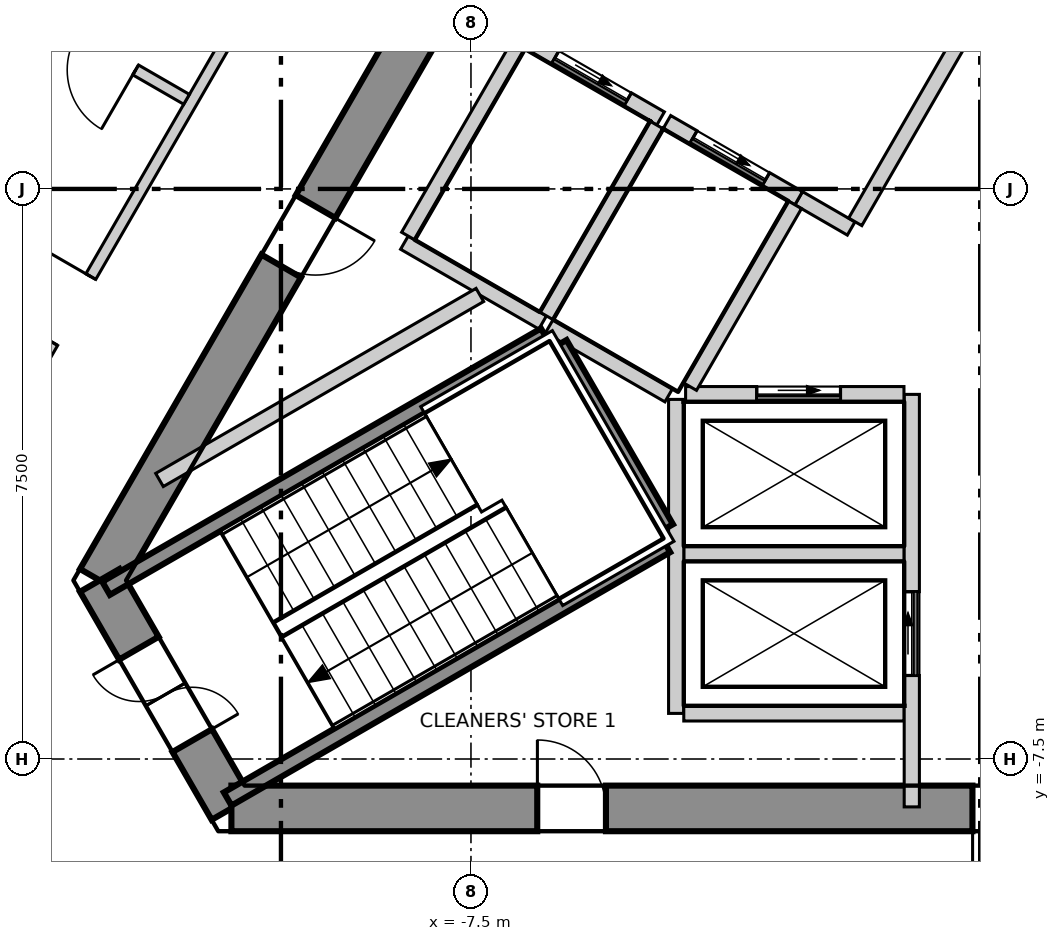
"""IFC4 building model, lengths in metres.
Left out: names, types, materials, properties, quantities, classifications, styles, units other than length and angle.
Written with IfcOpenShell. Run it as: python <this file> out.ifc"""

import sys

from ifc_helpers import new_model, si_unit, direction, frame, frame_2d, origin, place, context, subcontext, project, spatial, polyline, rectangle, outline, extrude, element, fill, save


model = new_model("IFC4")
c1 = context("Model", 3, precision=1e-05, world=origin(), true_north=direction((0.0, 1.0)))
c2 = subcontext(c1, "Body", "Model", "MODEL_VIEW")
j1 = project(units=[si_unit("LENGTHUNIT", "METRE"), si_unit("PLANEANGLEUNIT", "RADIAN")], contexts=[c1])
p1 = place(None, origin())
s1 = spatial("IfcSite", under=j1, at=p1, CompositionType="ELEMENT")
p2 = place(p1, origin())
s2 = spatial("IfcBuilding", under=s1, at=p2, CompositionType="ELEMENT")
p3 = place(p2, frame((0.0, 0.0, 279.1)))
s3 = spatial("IfcBuildingStorey", under=s2, at=p3, CompositionType="ELEMENT", Elevation=279.1)
p4 = place(p3, frame((-1.732, 13.3, -0.3), z_axis=(0.0, 0.0, 1.0), x_axis=(-0.500000539815, -0.866025092122, 0.0)))
e1 = element("IfcWall", 1, at=p4, inside=s3, PredefinedType="SHEAR", context=c2, shape_type="SweptSolid", body=[
    extrude(outline(polyline([(-0.173, -0.3), (1.795, -0.3), (3.763, -0.3), (5.732, -0.3), (7.7, -0.3), (9.668, -0.301), (11.637, -0.301), (13.605, -0.301), (15.573, -0.301), (17.542, -0.301), (19.51, -0.301), (21.478, -0.301), (21.131, 0.3), (19.226, 0.3), (17.321, 0.3), (15.415, 0.3), (13.51, 0.3), (11.605, 0.3), (9.699, 0.3), (7.794, 0.3), (5.889, 0.3), (3.984, 0.3), (2.078, 0.3), (0.173, 0.3), (-0.173, -0.3)])), origin(), (0.0, 0.0, 1.0), 3.6),
])
p5 = place(p4, frame((10.102, 0.0, 0.3)))
e2 = element("IfcOpeningElement", 2, at=p5, cuts=e1, PredefinedType="OPENING", context=c2, shape_type="SweptSolid", body=[
    extrude(rectangle(XDim=1.1, YDim=2.1, at=frame_2d((0.55, 1.05))), frame((0.0, 0.31, 0.0), z_axis=(0.0, -1.0, 0.0), x_axis=(1.0, 0.0, 0.0)), (0.0, 0.0, 1.0), 0.621),
])
p6 = place(p4, frame((15.627, 0.0, 0.3)))
e3 = element("IfcOpeningElement", 3, at=p6, cuts=e1, PredefinedType="OPENING", context=c2, shape_type="SweptSolid", body=[
    extrude(rectangle(XDim=0.9, YDim=2.1, at=frame_2d((0.45, 1.05))), frame((0.0, 0.31, 0.0), z_axis=(0.0, -1.0, 0.0), x_axis=(1.0, 0.0, 0.0)), (0.0, 0.0, 1.0), 0.621),
])
p7 = place(p3, frame((-12.384, -5.15, -0.3), z_axis=(0.0, 0.0, 1.0), x_axis=(0.49997462182, -0.866040055388, 0.0)))
e4 = element("IfcWall", 4, at=p7, inside=s3, PredefinedType="SHEAR", context=c2, shape_type="SweptSolid", body=[
    extrude(outline(polyline([(-0.173, -0.301), (1.732, -0.301), (3.637, -0.3), (3.291, 0.3), (1.732, 0.3), (0.173, 0.3), (-0.173, -0.301)])), origin(), (0.0, 0.0, 1.0), 3.6),
])
p8 = place(p7, frame((1.032, 0.0, 0.3)))
e5 = element("IfcOpeningElement", 5, at=p8, cuts=e4, PredefinedType="OPENING", context=c2, shape_type="SweptSolid", body=[
    extrude(rectangle(XDim=1.4, YDim=2.1, at=frame_2d((0.7, 1.05))), frame((0.0, 0.31, 0.0), z_axis=(0.0, -1.0, 0.0), x_axis=(1.0, 0.0, 0.0)), (0.0, 0.0, 1.0), 0.621),
])
p9 = place(p3, frame((-10.652, -8.15, -0.3), z_axis=(0.0, 0.0, 1.0), x_axis=(1.0, 0.0, 0.0)))
e6 = element("IfcWall", 6, at=p9, inside=s3, PredefinedType="SHEAR", context=c2, shape_type="SweptSolid", body=[
    extrude(outline(polyline([(-0.173, -0.3), (1.795, -0.3), (3.763, -0.3), (5.731, -0.3), (7.7, -0.3), (9.668, -0.3), (11.636, -0.3), (13.604, -0.3), (15.573, -0.3), (17.541, -0.3), (19.509, -0.3), (21.477, -0.3), (21.131, 0.3), (19.226, 0.3), (17.321, 0.3), (15.415, 0.3), (13.51, 0.3), (11.605, 0.3), (9.699, 0.3), (7.794, 0.3), (5.889, 0.3), (3.984, 0.3), (2.078, 0.3), (0.173, 0.3), (-0.173, -0.3)])), origin(), (0.0, 0.0, 1.0), 3.6),
])
p10 = place(p9, frame((9.752, 0.0, 0.3)))
e7 = element("IfcOpeningElement", 7, at=p10, cuts=e6, PredefinedType="OPENING", context=c2, shape_type="SweptSolid", body=[
    extrude(rectangle(XDim=1.8, YDim=2.1, at=frame_2d((0.9, 1.05))), frame((0.0, 0.31, 0.0), z_axis=(0.0, -1.0, 0.0), x_axis=(1.0, 0.0, 0.0)), (0.0, 0.0, 1.0), 0.62),
])
p11 = place(p9, frame((4.026, 0.0, 0.3)))
e8 = element("IfcOpeningElement", 8, at=p11, cuts=e6, PredefinedType="OPENING", context=c2, shape_type="SweptSolid", body=[
    extrude(rectangle(XDim=0.9, YDim=2.1, at=frame_2d((0.45, 1.05))), frame((0.0, 0.31, 0.0), z_axis=(0.0, -1.0, 0.0), x_axis=(1.0, 0.0, 0.0)), (0.0, 0.0, 1.0), 0.62),
])
p12 = place(p9, frame((16.378, 0.0, 0.3)))
e9 = element("IfcOpeningElement", 9, at=p12, cuts=e6, PredefinedType="OPENING", context=c2, shape_type="SweptSolid", body=[
    extrude(rectangle(XDim=0.9, YDim=2.1, at=frame_2d((0.45, 1.05))), frame((0.0, 0.31, 0.0), z_axis=(0.0, -1.0, 0.0), x_axis=(1.0, 0.0, 0.0)), (0.0, 0.0, 1.0), 0.62),
])
p13 = place(p3, frame((-2.536, 28.316, 0.0), z_axis=(0.0, 0.0, 1.0), x_axis=(-0.500006870765, -0.86602143691, 0.0)))
e10 = element("IfcWall", 10, at=p13, inside=s3, PredefinedType="ELEMENTEDWALL", context=c2, shape_type="SweptSolid", body=[
    extrude(rectangle(XDim=46.49, YDim=0.2, at=frame_2d((23.245, 0.0))), origin(), (0.0, 0.0, 1.0), 3.3),
])
p14 = place(p13, frame((2.196, 0.0, 0.9)))
e11 = element("IfcOpeningElement", 11, at=p14, cuts=e10, PredefinedType="OPENING", context=c2, shape_type="SweptSolid", body=[
    extrude(rectangle(XDim=3.7, YDim=2.2, at=frame_2d((1.85, 1.1))), frame((0.0, 0.11, 0.0), z_axis=(0.0, -1.0, 0.0), x_axis=(1.0, 0.0, 0.0)), (0.0, 0.0, 1.0), 0.22),
])
p15 = place(p13, frame((7.684, 0.0, 0.9)))
e12 = element("IfcOpeningElement", 12, at=p15, cuts=e10, PredefinedType="OPENING", context=c2, shape_type="SweptSolid", body=[
    extrude(rectangle(XDim=3.7, YDim=2.2, at=frame_2d((1.85, 1.1))), frame((0.0, 0.11, 0.0), z_axis=(0.0, -1.0, 0.0), x_axis=(1.0, 0.0, 0.0)), (0.0, 0.0, 1.0), 0.22),
])
p16 = place(p13, frame((13.172, 0.0, 0.9)))
e13 = element("IfcOpeningElement", 13, at=p16, cuts=e10, PredefinedType="OPENING", context=c2, shape_type="SweptSolid", body=[
    extrude(rectangle(XDim=3.7, YDim=2.2, at=frame_2d((1.85, 1.1))), frame((0.0, 0.11, 0.0), z_axis=(0.0, -1.0, 0.0), x_axis=(1.0, 0.0, 0.0)), (0.0, 0.0, 1.0), 0.22),
])
p17 = place(p13, frame((18.66, 0.0, 0.9)))
e14 = element("IfcOpeningElement", 14, at=p17, cuts=e10, PredefinedType="OPENING", context=c2, shape_type="SweptSolid", body=[
    extrude(rectangle(XDim=3.7, YDim=2.2, at=frame_2d((1.85, 1.1))), frame((0.0, 0.11, 0.0), z_axis=(0.0, -1.0, 0.0), x_axis=(1.0, 0.0, 0.0)), (0.0, 0.0, 1.0), 0.22),
])
p18 = place(p13, frame((24.148, 0.0, 0.9)))
e15 = element("IfcOpeningElement", 15, at=p18, cuts=e10, PredefinedType="OPENING", context=c2, shape_type="SweptSolid", body=[
    extrude(rectangle(XDim=3.7, YDim=2.2, at=frame_2d((1.85, 1.1))), frame((0.0, 0.11, 0.0), z_axis=(0.0, -1.0, 0.0), x_axis=(1.0, 0.0, 0.0)), (0.0, 0.0, 1.0), 0.22),
])
p19 = place(p13, frame((29.636, 0.0, 0.9)))
e16 = element("IfcOpeningElement", 16, at=p19, cuts=e10, PredefinedType="OPENING", context=c2, shape_type="SweptSolid", body=[
    extrude(rectangle(XDim=3.7, YDim=2.2, at=frame_2d((1.85, 1.1))), frame((0.0, 0.11, 0.0), z_axis=(0.0, -1.0, 0.0), x_axis=(1.0, 0.0, 0.0)), (0.0, 0.0, 1.0), 0.22),
])
p20 = place(p13, frame((35.124, 0.0, 0.9)))
e17 = element("IfcOpeningElement", 17, at=p20, cuts=e10, PredefinedType="OPENING", context=c2, shape_type="SweptSolid", body=[
    extrude(rectangle(XDim=3.7, YDim=2.2, at=frame_2d((1.85, 1.1))), frame((0.0, 0.11, 0.0), z_axis=(0.0, -1.0, 0.0), x_axis=(1.0, 0.0, 0.0)), (0.0, 0.0, 1.0), 0.22),
])
p21 = place(p13, frame((40.612, 0.0, 0.9)))
e18 = element("IfcOpeningElement", 18, at=p21, cuts=e10, PredefinedType="OPENING", context=c2, shape_type="SweptSolid", body=[
    extrude(rectangle(XDim=3.7, YDim=2.2, at=frame_2d((1.85, 1.1))), frame((0.0, 0.11, 0.0), z_axis=(0.0, -1.0, 0.0), x_axis=(1.0, 0.0, 0.0)), (0.0, 0.0, 1.0), 0.22),
])
p22 = place(p3, frame((-17.678, -10.119, 0.0), z_axis=(0.0, 0.0, 1.0), x_axis=(0.500003190174, 0.866023561929, 0.0)))
e19 = element("IfcWall", 19, at=p22, inside=s3, PredefinedType="PARTITIONING", context=c2, shape_type="SweptSolid", body=[
    extrude(rectangle(XDim=35.356, YDim=0.15, at=frame_2d((17.678, 0.0))), origin(), (0.0, 0.0, 1.0), 3.3),
])
p23 = place(p22, frame((28.706, 0.0, 0.0)))
e20 = element("IfcOpeningElement", 20, at=p23, cuts=e19, PredefinedType="OPENING", context=c2, shape_type="SweptSolid", body=[
    extrude(rectangle(XDim=1.0, YDim=2.1, at=frame_2d((0.5, 1.05))), frame((0.0, 0.085, 0.0), z_axis=(0.0, -1.0, 0.0), x_axis=(1.0, 0.0, 0.0)), (0.0, 0.0, 1.0), 0.17),
])
p24 = place(p22, frame((18.74, 0.0, 0.0)))
e21 = element("IfcOpeningElement", 21, at=p24, cuts=e19, PredefinedType="OPENING", context=c2, shape_type="SweptSolid", body=[
    extrude(rectangle(XDim=1.0, YDim=2.1, at=frame_2d((0.5, 1.05))), frame((0.0, 0.085, 0.0), z_axis=(0.0, -1.0, 0.0), x_axis=(1.0, 0.0, 0.0)), (0.0, 0.0, 1.0), 0.17),
])
p25 = place(p22, frame((9.352, 0.0, 0.0)))
e22 = element("IfcOpeningElement", 22, at=p25, cuts=e19, PredefinedType="OPENING", context=c2, shape_type="SweptSolid", body=[
    extrude(rectangle(XDim=1.0, YDim=2.1, at=frame_2d((0.5, 1.05))), frame((0.0, 0.085, 0.0), z_axis=(0.0, -1.0, 0.0), x_axis=(1.0, 0.0, 0.0)), (0.0, 0.0, 1.0), 0.17),
])
p26 = place(p22, frame((2.777, 0.0, 0.0)))
e23 = element("IfcOpeningElement", 23, at=p26, cuts=e19, PredefinedType="OPENING", context=c2, shape_type="SweptSolid", body=[
    extrude(rectangle(XDim=1.0, YDim=2.1, at=frame_2d((0.5, 1.05))), frame((0.0, 0.085, 0.0), z_axis=(0.0, -1.0, 0.0), x_axis=(1.0, 0.0, 0.0)), (0.0, 0.0, 1.0), 0.17),
])
p27 = place(p3, frame((-13.364, 2.404, 0.0), z_axis=(0.0, 0.0, 1.0), x_axis=(0.8660395779, -0.499975448907, 0.0)))
e24 = element("IfcWall", 24, at=p27, inside=s3, PredefinedType="PARTITIONING", context=c2, shape_type="SweptSolid", body=[
    extrude(rectangle(XDim=2.45, YDim=0.15, at=frame_2d((1.225, 0.0))), origin(), (0.0, 0.0, 1.0), 3.3),
])
p28 = place(p27, frame((0.776, 0.0, 0.0)))
e25 = element("IfcOpeningElement", 25, at=p28, cuts=e24, PredefinedType="OPENING", context=c2, shape_type="SweptSolid", body=[
    extrude(rectangle(XDim=0.9, YDim=2.1, at=frame_2d((0.45, 1.05))), frame((0.0, 0.085, 0.0), z_axis=(0.0, -1.0, 0.0), x_axis=(1.0, 0.0, 0.0)), (0.0, 0.0, 1.0), 0.17),
])
p29 = place(p3, frame((-8.376, -0.707, 0.0), z_axis=(0.0, 0.0, 1.0), x_axis=(0.866067520717, -0.499927044236, 0.0)))
e26 = element("IfcWall", 26, at=p29, inside=s3, PredefinedType="SOLIDWALL", context=c2, shape_type="SweptSolid", body=[
    extrude(rectangle(XDim=2.1, YDim=0.2, at=frame_2d((1.05, 0.0))), origin(), (0.0, 0.0, 1.0), 3.3),
])
p30 = place(p3, frame((-8.326, -0.62, 0.0), z_axis=(0.0, 0.0, 1.0), x_axis=(0.500023687443, 0.866011727401, 0.0)))
e27 = element("IfcWall", 27, at=p30, inside=s3, PredefinedType="SOLIDWALL", context=c2, shape_type="SweptSolid", body=[
    extrude(rectangle(XDim=2.9, YDim=0.2, at=frame_2d((1.45, 0.0))), origin(), (0.0, 0.0, 1.0), 3.3),
])
p31 = place(p3, frame((-4.7, -4.8, 0.0), z_axis=(0.0, 0.0, 1.0), x_axis=(1.0, 0.0, 0.0)))
e28 = element("IfcWall", 28, at=p31, inside=s3, PredefinedType="SOLIDWALL", context=c2, shape_type="SweptSolid", body=[
    extrude(rectangle(XDim=2.9, YDim=0.2, at=frame_2d((1.45, 0.0))), origin(), (0.0, 0.0, 1.0), 3.3),
])
p32 = place(p3, frame((-4.8, -6.9, 0.0), z_axis=(0.0, 0.0, 1.0), x_axis=(0.0, 1.0, 0.0)))
e29 = element("IfcWall", 29, at=p32, inside=s3, PredefinedType="SOLIDWALL", context=c2, shape_type="SweptSolid", body=[
    extrude(rectangle(XDim=4.131, YDim=0.2, at=frame_2d((2.065, 0.0))), origin(), (0.0, 0.0, 1.0), 3.3),
])
p33 = place(p3, frame((-4.7, -6.9, 0.0), z_axis=(0.0, 0.0, 1.0), x_axis=(1.0, 0.0, 0.0)))
e30 = element("IfcWall", 30, at=p33, inside=s3, PredefinedType="SOLIDWALL", context=c2, shape_type="SweptSolid", body=[
    extrude(rectangle(XDim=2.9, YDim=0.2, at=frame_2d((1.45, 0.0))), origin(), (0.0, 0.0, 1.0), 3.3),
])
p34 = place(p3, frame((-1.7, -8.13, 0.0), z_axis=(0.0, 0.0, 1.0), x_axis=(0.0, 1.0, 0.0)))
e31 = element("IfcWall", 31, at=p34, inside=s3, PredefinedType="SOLIDWALL", context=c2, shape_type="SweptSolid", body=[
    extrude(rectangle(XDim=5.427, YDim=0.2, at=frame_2d((2.713, 0.0))), origin(), (0.0, 0.0, 1.0), 3.3),
])
p35 = place(p34, frame((1.73, 0.0, 0.0)))
e32 = element("IfcOpeningElement", 32, at=p35, cuts=e31, PredefinedType="OPENING", context=c2, shape_type="SweptSolid", body=[
    extrude(rectangle(XDim=1.1, YDim=2.1, at=frame_2d((0.55, 1.05))), frame((0.0, 0.11, 0.0), z_axis=(0.0, -1.0, 0.0), x_axis=(1.0, 0.0, 0.0)), (0.0, 0.0, 1.0), 0.22),
])
p36 = place(p3, frame((-4.676, -2.7, 0.0), z_axis=(0.0, 0.0, 1.0), x_axis=(1.0, 0.0, 0.0)))
e33 = element("IfcWall", 33, at=p36, inside=s3, PredefinedType="SOLIDWALL", context=c2, shape_type="SweptSolid", body=[
    extrude(rectangle(XDim=2.873, YDim=0.2, at=frame_2d((1.437, 0.0))), origin(), (0.0, 0.0, 1.0), 3.3),
])
p37 = place(p36, frame((0.937, 0.0, 0.0)))
e34 = element("IfcOpeningElement", 34, at=p37, cuts=e33, PredefinedType="OPENING", context=c2, shape_type="SweptSolid", body=[
    extrude(rectangle(XDim=1.1, YDim=2.1, at=frame_2d((0.55, 1.05))), frame((0.0, 0.11, 0.0), z_axis=(0.0, -1.0, 0.0), x_axis=(1.0, 0.0, 0.0)), (0.0, 0.0, 1.0), 0.22),
])
p38 = place(p3, frame((-7.891, 2.593, 0.0), z_axis=(0.0, 0.0, 1.0), x_axis=(0.866070917804, -0.499921159118, 0.0)))
e35 = element("IfcWall", 35, at=p38, inside=s3, PredefinedType="SOLIDWALL", context=c2, shape_type="SweptSolid", body=[
    extrude(rectangle(XDim=3.333, YDim=0.2, at=frame_2d((1.666, 0.0))), origin(), (0.0, 0.0, 1.0), 3.3),
])
p39 = place(p38, frame((1.73, 0.0, 0.0)))
e36 = element("IfcOpeningElement", 36, at=p39, cuts=e35, PredefinedType="OPENING", context=c2, shape_type="SweptSolid", body=[
    extrude(rectangle(XDim=1.1, YDim=2.1, at=frame_2d((0.55, 1.05))), frame((0.0, 0.11, 0.0), z_axis=(0.0, -1.0, 0.0), x_axis=(1.0, 0.0, 0.0)), (0.0, 0.0, 1.0), 0.22),
])
p40 = place(p3, frame((-3.188, -0.122, 0.0), z_axis=(0.0, 0.0, 1.0), x_axis=(0.865705793592, -0.50055317294, 0.0)))
e37 = element("IfcWall", 37, at=p40, inside=s3, PredefinedType="SOLIDWALL", context=c2, shape_type="SweptSolid", body=[
    extrude(rectangle(XDim=0.797, YDim=0.2, at=frame_2d((0.398, 0.0))), origin(), (0.0, 0.0, 1.0), 3.3),
])
p41 = place(p3, frame((-2.444, -0.433, 0.0), z_axis=(0.0, 0.0, 1.0), x_axis=(0.500035624827, 0.866004834804, 0.0)))
e38 = element("IfcWall", 38, at=p41, inside=s3, PredefinedType="SOLIDWALL", context=c2, shape_type="SweptSolid", body=[
    extrude(rectangle(XDim=3.194, YDim=0.2, at=frame_2d((1.597, 0.0))), origin(), (0.0, 0.0, 1.0), 3.3),
])
p42 = place(p3, frame((-6.507, -1.67, 0.0), z_axis=(0.0, 0.0, 1.0), x_axis=(0.50012328804, 0.865954211699, 0.0)))
e39 = element("IfcWall", 39, at=p42, inside=s3, PredefinedType="SOLIDWALL", context=c2, shape_type="SweptSolid", body=[
    extrude(rectangle(XDim=2.9, YDim=0.2, at=frame_2d((1.45, 0.0))), origin(), (0.0, 0.0, 1.0), 3.3),
])
p43 = place(p3, frame((-6.47, -1.807, 0.0), z_axis=(0.0, 0.0, 1.0), x_axis=(0.865883195159, -0.500246231712, 0.0)))
e40 = element("IfcWall", 40, at=p43, inside=s3, PredefinedType="SOLIDWALL", context=c2, shape_type="SweptSolid", body=[
    extrude(rectangle(XDim=1.815, YDim=0.2, at=frame_2d((0.908, 0.0))), origin(), (0.0, 0.0, 1.0), 3.3),
])
p44 = place(p3, frame((-4.922, 0.879, 0.0), z_axis=(0.0, 0.0, 1.0), x_axis=(0.866073918653, -0.499915960366, 0.0)))
e41 = element("IfcWall", 41, at=p44, inside=s3, PredefinedType="SOLIDWALL", context=c2, shape_type="SweptSolid", body=[
    extrude(rectangle(XDim=2.002, YDim=0.2, at=frame_2d((1.001, 0.0))), origin(), (0.0, 0.0, 1.0), 3.3),
])
p45 = place(p44, frame((0.402, 0.0, 0.0)))
e42 = element("IfcOpeningElement", 42, at=p45, cuts=e41, PredefinedType="OPENING", context=c2, shape_type="SweptSolid", body=[
    extrude(rectangle(XDim=1.1, YDim=2.1, at=frame_2d((0.55, 1.05))), frame((0.0, 0.11, 0.0), z_axis=(0.0, -1.0, 0.0), x_axis=(1.0, 0.0, 0.0)), (0.0, 0.0, 1.0), 0.22),
])
p46 = place(p3, frame((-4.619, -2.6, 0.0), z_axis=(0.0, 0.0, 1.0), x_axis=(0.50009492287, 0.865970593103, 0.0)))
e43 = element("IfcWall", 43, at=p46, inside=s3, PredefinedType="SOLIDWALL", context=c2, shape_type="SweptSolid", body=[
    extrude(rectangle(XDim=2.761, YDim=0.2, at=frame_2d((1.381, 0.0))), origin(), (0.0, 0.0, 1.0), 3.3),
])
p47 = place(p3, frame((-11.598, -3.829, 0.0), z_axis=(0.0, 0.0, 1.0), x_axis=(0.865968383994, 0.500098748171, 0.0)))
e44 = element("IfcWall", 44, at=p47, inside=s3, PredefinedType="SOLIDWALL", context=c2, shape_type="SweptSolid", body=[
    extrude(rectangle(XDim=4.867, YDim=0.2, at=frame_2d((2.434, 0.0))), origin(), (0.0, 0.0, 1.0), 3.3),
])
p48 = place(p3, frame((-12.301, -5.254, 0.0), z_axis=(0.0, 0.0, 1.0), x_axis=(0.866068467981, 0.499925403204, 0.0)))
e45 = element("IfcWall", 45, at=p48, inside=s3, PredefinedType="SOLIDWALL", context=c2, shape_type="SweptSolid", body=[
    extrude(rectangle(XDim=6.665, YDim=0.2, at=frame_2d((3.332, 0.0))), origin(), (0.0, 0.0, 1.0), 3.3),
])
p49 = place(p3, frame((-6.329, -2.038, 0.0), z_axis=(0.0, 0.0, 1.0), x_axis=(0.500200581029, -0.865909567298, 0.0)))
e46 = element("IfcWall", 46, at=p49, inside=s3, PredefinedType="SOLIDWALL", context=c2, shape_type="SweptSolid", body=[
    extrude(rectangle(XDim=2.799, YDim=0.2, at=frame_2d((1.399, 0.0))), origin(), (0.0, 0.0, 1.0), 3.3),
])
p50 = place(p3, frame((-10.701, -8.026, 0.0), z_axis=(0.0, 0.0, 1.0), x_axis=(0.866005022404, 0.500035299925, 0.0)))
e47 = element("IfcWall", 47, at=p50, inside=s3, PredefinedType="SOLIDWALL", context=c2, shape_type="SweptSolid", body=[
    extrude(rectangle(XDim=6.665, YDim=0.2, at=frame_2d((3.333, 0.0))), origin(), (0.0, 0.0, 1.0), 3.3),
])
p51 = place(p37, origin())
e48 = element("IfcDoor", 48, at=p51, inside=s3, OperationType="SLIDING_TO_LEFT", PredefinedType="DOOR", context=c2, shape_type="SweptSolid", body=[
    extrude(rectangle(XDim=1.1, YDim=2.1, at=frame_2d((0.55, 1.05))), frame((0.0, 0.025, 0.0), z_axis=(0.0, -1.0, 0.0), x_axis=(1.0, 0.0, 0.0)), (0.0, 0.0, 1.0), 0.05),
])
fill(e34, e48)
p52 = place(p35, origin())
e49 = element("IfcDoor", 49, at=p52, inside=s3, OperationType="SLIDING_TO_LEFT", PredefinedType="DOOR", context=c2, shape_type="SweptSolid", body=[
    extrude(rectangle(XDim=1.1, YDim=2.1, at=frame_2d((0.55, 1.05))), frame((0.0, 0.025, 0.0), z_axis=(0.0, -1.0, 0.0), x_axis=(1.0, 0.0, 0.0)), (0.0, 0.0, 1.0), 0.05),
])
fill(e32, e49)
p53 = place(p45, origin())
e50 = element("IfcDoor", 50, at=p53, inside=s3, OperationType="SLIDING_TO_LEFT", PredefinedType="DOOR", context=c2, shape_type="SweptSolid", body=[
    extrude(rectangle(XDim=1.1, YDim=2.1, at=frame_2d((0.55, 1.05))), frame((0.0, 0.025, 0.0), z_axis=(0.0, -1.0, 0.0), x_axis=(1.0, 0.0, 0.0)), (0.0, 0.0, 1.0), 0.05),
])
fill(e42, e50)
p54 = place(p39, origin())
e51 = element("IfcDoor", 51, at=p54, inside=s3, OperationType="SLIDING_TO_LEFT", PredefinedType="DOOR", context=c2, shape_type="SweptSolid", body=[
    extrude(rectangle(XDim=1.1, YDim=2.1, at=frame_2d((0.55, 1.05))), frame((0.0, 0.025, 0.0), z_axis=(0.0, -1.0, 0.0), x_axis=(1.0, 0.0, 0.0)), (0.0, 0.0, 1.0), 0.05),
])
fill(e36, e51)
p55 = place(p25, origin())
e52 = element("IfcDoor", 52, at=p55, inside=s3, OperationType="SINGLE_SWING_LEFT", PredefinedType="DOOR", context=c2, shape_type="SweptSolid", body=[
    extrude(rectangle(XDim=1.0, YDim=2.1, at=frame_2d((0.5, 1.05))), frame((0.0, 0.025, 0.0), z_axis=(0.0, -1.0, 0.0), x_axis=(1.0, 0.0, 0.0)), (0.0, 0.0, 1.0), 0.05),
])
fill(e22, e52)
p56 = place(p28, origin())
e53 = element("IfcDoor", 53, at=p56, inside=s3, OperationType="SINGLE_SWING_RIGHT", PredefinedType="DOOR", context=c2, shape_type="SweptSolid", body=[
    extrude(rectangle(XDim=0.9, YDim=2.1, at=frame_2d((0.45, 1.05))), frame((0.0, 0.025, 0.0), z_axis=(0.0, -1.0, 0.0), x_axis=(1.0, 0.0, 0.0)), (0.0, 0.0, 1.0), 0.05),
])
fill(e25, e53)
p57 = place(p10, origin())
e54 = element("IfcDoor", 54, at=p57, inside=s3, OperationType="DOUBLE_DOOR_SINGLE_SWING", PredefinedType="DOOR", context=c2, shape_type="SweptSolid", body=[
    extrude(rectangle(XDim=1.8, YDim=2.1, at=frame_2d((0.9, 1.05))), frame((0.0, 0.025, 0.0), z_axis=(0.0, -1.0, 0.0), x_axis=(1.0, 0.0, 0.0)), (0.0, 0.0, 1.0), 0.05),
])
fill(e7, e54)
p58 = place(p8, origin())
e55 = element("IfcDoor", 55, at=p58, inside=s3, OperationType="DOUBLE_DOOR_SINGLE_SWING", PredefinedType="DOOR", context=c2, shape_type="SweptSolid", body=[
    extrude(rectangle(XDim=1.4, YDim=2.1, at=frame_2d((0.7, 1.05))), frame((0.0, 0.025, 0.0), z_axis=(0.0, -1.0, 0.0), x_axis=(1.0, 0.0, 0.0)), (0.0, 0.0, 1.0), 0.05),
])
fill(e5, e55)
p59 = place(p6, origin())
e56 = element("IfcDoor", 56, at=p59, inside=s3, OperationType="SINGLE_SWING_RIGHT", PredefinedType="DOOR", context=c2, shape_type="SweptSolid", body=[
    extrude(rectangle(XDim=0.9, YDim=2.1, at=frame_2d((0.45, 1.05))), frame((0.0, 0.025, 0.0), z_axis=(0.0, -1.0, 0.0), x_axis=(1.0, 0.0, 0.0)), (0.0, 0.0, 1.0), 0.05),
])
fill(e3, e56)
p60 = place(p11, origin())
e57 = element("IfcDoor", 57, at=p60, inside=s3, OperationType="SINGLE_SWING_RIGHT", PredefinedType="DOOR", context=c2, shape_type="SweptSolid", body=[
    extrude(rectangle(XDim=0.9, YDim=2.1, at=frame_2d((0.45, 1.05))), frame((0.0, 0.025, 0.0), z_axis=(0.0, -1.0, 0.0), x_axis=(1.0, 0.0, 0.0)), (0.0, 0.0, 1.0), 0.05),
])
fill(e8, e57)
save(model, sys.argv[1])
